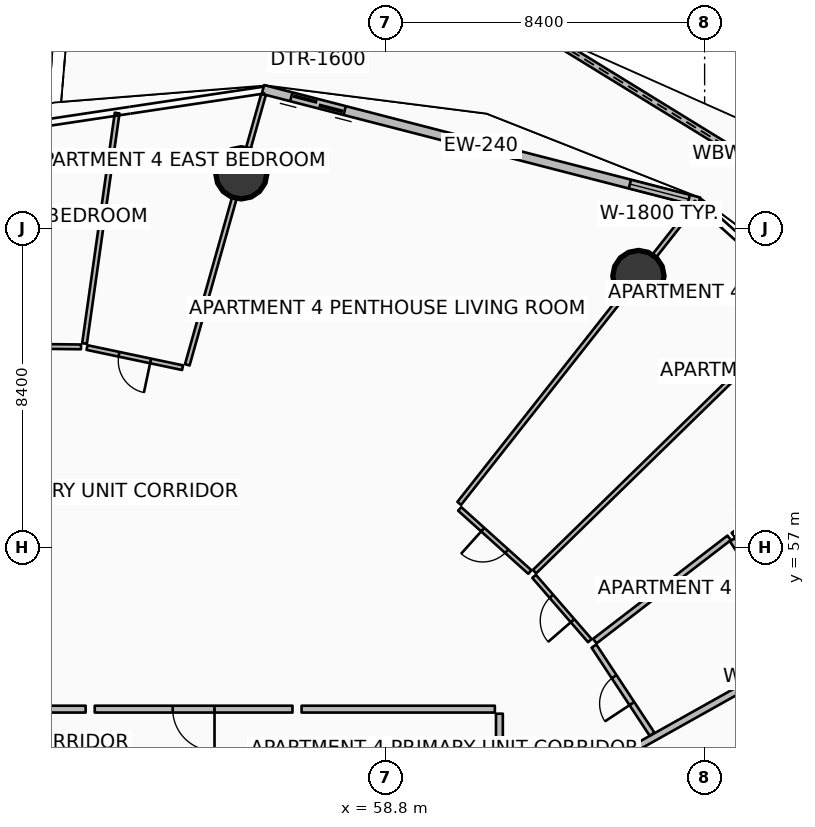
"""IFC4 building model, lengths in metres.
Left out: names, types, materials, properties, quantities, classifications, styles, units other than length and angle.
Written with IfcOpenShell. Run it as: python <this file> out.ifc"""

import sys

from ifc_helpers import new_model, si_unit, direction, frame, frame_2d, origin, origin_2d, place, context, subcontext, project, spatial, polyline, rectangle, circle, outline, extrude, element, fill, save


model = new_model("IFC4")
c1 = context("Model", 3, precision=1e-05, world=origin(), true_north=direction((0.0, 1.0)))
c2 = subcontext(c1, "Body", "Model", "MODEL_VIEW")
j1 = project(units=[si_unit("LENGTHUNIT", "METRE"), si_unit("PLANEANGLEUNIT", "RADIAN")], contexts=[c1])
p1 = place(None, origin())
s1 = spatial("IfcSite", under=j1, at=p1, CompositionType="ELEMENT")
p2 = place(p1, origin())
s2 = spatial("IfcBuilding", under=s1, at=p2, CompositionType="ELEMENT")
p3 = place(p2, frame((0.0, 0.0, 67.65)))
s3 = spatial("IfcBuildingStorey", under=s2, at=p3, CompositionType="ELEMENT", Elevation=67.65)
for number, where, z_axis, x_axis in (
    (1, (65.458, 64.146, 0.0), (0.0, 0.0, 1.0), (1.0, 0.0, 0.0)),
    (2, (55.008, 66.849, 0.0), (0.0, 0.0, 1.0), (1.0, 0.0, 0.0)),
):
    element("IfcColumn", number, at=place(p3, frame(where, z_axis=z_axis, x_axis=x_axis)), inside=s3, PredefinedType="COLUMN", context=c2, shape_type="SweptSolid", body=[
        extrude(circle(Radius=0.675, at=origin_2d()), origin(), (0.0, 0.0, 1.0), 3.35),
    ])
p4 = place(p3, frame((73.488, 64.039, 0.0), z_axis=(0.0, 0.0, 1.0), x_axis=(-0.851732671453, 0.523976579991, 0.0)))
e3 = element("IfcWall", 3, at=p4, inside=s3, PredefinedType="PARAPET", context=c2, shape_type="SweptSolid", body=[
    extrude(outline(polyline([(0.0, 0.0), (12.625, 0.0), (12.625, 1.832), (6.312, 1.696), (0.0, 1.497), (0.0, 0.0)])), frame((0.0, 0.09, 0.0), z_axis=(0.0, -1.0, 0.0), x_axis=(1.0, 0.0, 0.0)), (0.0, 0.0, 1.0), 0.18),
])
p5 = place(p3, frame((50.114, 71.14, 0.0), z_axis=(0.0, 0.0, 1.0), x_axis=(-0.956262130287, -0.292511090695, 0.0)))
e4 = element("IfcWall", 4, at=p5, inside=s3, PredefinedType="PARAPET", context=c2, shape_type="SweptSolid", body=[
    extrude(outline(polyline([(0.0, 0.0), (10.897, 0.0), (10.897, 1.348), (5.448, 1.562), (0.0, 1.747), (0.0, 0.0)])), frame((0.0, 0.09, 0.0), z_axis=(0.0, -1.0, 0.0), x_axis=(1.0, 0.0, 0.0)), (0.0, 0.0, 1.0), 0.18),
])
p6 = place(p3, frame((67.054, 66.096, 0.0), z_axis=(0.0, 0.0, 1.0), x_axis=(-0.96833871487, 0.249640007378, 0.0)))
e5 = element("IfcWall", 5, at=p6, inside=s3, PredefinedType="SOLIDWALL", context=c2, shape_type="SweptSolid", body=[
    extrude(rectangle(XDim=11.851, YDim=0.24, at=frame_2d((5.926, 0.0))), origin(), (0.0, 0.0, 1.0), 2.3),
])
p7 = place(p6, frame((9.631, 0.0, 0.0)))
e6 = element("IfcOpeningElement", 6, at=p7, cuts=e5, PredefinedType="OPENING", context=c2, shape_type="SweptSolid", body=[
    extrude(rectangle(XDim=1.45, YDim=2.15, at=frame_2d((0.725, 1.075))), frame((0.0, 0.13, 0.0), z_axis=(0.0, -1.0, 0.0), x_axis=(1.0, 0.0, 0.0)), (0.0, 0.0, 1.0), 0.26),
])
p8 = place(p6, frame((0.28, 0.0, 0.65)))
e7 = element("IfcOpeningElement", 7, at=p8, cuts=e5, PredefinedType="OPENING", context=c2, shape_type="SweptSolid", body=[
    extrude(rectangle(XDim=1.6, YDim=1.5, at=frame_2d((0.8, 0.75))), frame((0.0, 0.13, 0.0), z_axis=(0.0, -1.0, 0.0), x_axis=(1.0, 0.0, 0.0)), (0.0, 0.0, 1.0), 0.26),
])
p9 = place(p3, frame((61.896, 49.782, 0.0), z_axis=(0.0, 0.0, 1.0), x_axis=(0.872493215695, 0.488626225828, 0.0)))
e8 = element("IfcWall", 8, at=p9, inside=s3, PredefinedType="PARTITIONING", context=c2, shape_type="SweptSolid", body=[
    extrude(rectangle(XDim=15.612, YDim=0.18, at=frame_2d((7.806, 0.0))), origin(), (0.0, 0.0, 1.0), 2.717),
])
p10 = place(p3, frame((66.115, 49.008, 0.0), z_axis=(0.0, 0.0, 1.0), x_axis=(0.932641955578, 0.360803246514, 0.0)))
e9 = element("IfcWall", 9, at=p10, inside=s3, PredefinedType="PARTITIONING", context=c2, shape_type="SweptSolid", body=[
    extrude(rectangle(XDim=11.556, YDim=0.125, at=frame_2d((5.778, 0.0))), origin(), (0.0, 0.0, 1.0), 2.79),
])
p11 = place(p3, frame((56.354, 52.75, 0.0), z_axis=(0.0, 0.0, 1.0), x_axis=(-1.0, 0.0, 0.0)))
e10 = element("IfcWall", 10, at=p11, inside=s3, PredefinedType="PARTITIONING", context=c2, shape_type="SweptSolid", body=[
    extrude(rectangle(XDim=5.203, YDim=0.18, at=frame_2d((2.601, 0.0))), origin(), (0.0, 0.0, 1.0), 2.717),
])
p12 = place(p11, frame((2.052, 0.0, 0.0)))
e11 = element("IfcOpeningElement", 11, at=p12, cuts=e10, PredefinedType="OPENING", context=c2, shape_type="SweptSolid", body=[
    extrude(rectangle(XDim=1.1, YDim=2.1, at=frame_2d((0.55, 1.05))), frame((0.0, 0.1, 0.0), z_axis=(0.0, -1.0, 0.0), x_axis=(1.0, 0.0, 0.0)), (0.0, 0.0, 1.0), 0.2),
])
p13 = place(p3, frame((61.8, 49.848, 0.0), z_axis=(0.0, 0.0, 1.0), x_axis=(0.0, 1.0, 0.0)))
e12 = element("IfcWall", 12, at=p13, inside=s3, PredefinedType="PARTITIONING", context=c2, shape_type="SweptSolid", body=[
    extrude(rectangle(XDim=2.781, YDim=0.18, at=frame_2d((1.391, 0.0))), origin(), (0.0, 0.0, 1.0), 2.717),
])
p14 = place(p3, frame((61.68, 52.75, 0.0), z_axis=(0.0, 0.0, 1.0), x_axis=(-1.0, 0.0, 0.0)))
e13 = element("IfcWall", 13, at=p14, inside=s3, PredefinedType="PARTITIONING", context=c2, shape_type="SweptSolid", body=[
    extrude(rectangle(XDim=5.085, YDim=0.18, at=frame_2d((2.543, 0.0))), origin(), (0.0, 0.0, 1.0), 2.717),
])
p15 = place(p3, frame((60.743, 58.164, 0.0), z_axis=(0.0, 0.0, 1.0), x_axis=(0.61907620874, 0.785330916093, 0.0)))
e14 = element("IfcWall", 14, at=p15, inside=s3, PredefinedType="PARTITIONING", context=c2, shape_type="SweptSolid", body=[
    extrude(rectangle(XDim=10.091, YDim=0.125, at=frame_2d((5.046, 0.0))), origin(), (0.0, 0.0, 1.0), 2.717),
])
p16 = place(p3, frame((65.816, 52.092, 0.0), z_axis=(0.0, 0.0, 1.0), x_axis=(-0.550532146696, 0.834813964578, 0.0)))
e15 = element("IfcWall", 15, at=p16, inside=s3, PredefinedType="PARTITIONING", context=c2, shape_type="SweptSolid", body=[
    extrude(rectangle(XDim=2.776, YDim=0.15, at=frame_2d((1.388, 0.0))), origin(), (0.0, 0.0, 1.0), 2.717),
])
p17 = place(p16, frame((0.963, 0.0, 0.0)))
e16 = element("IfcOpeningElement", 16, at=p17, cuts=e15, PredefinedType="OPENING", context=c2, shape_type="SweptSolid", body=[
    extrude(rectangle(XDim=0.85, YDim=2.06, at=frame_2d((0.425, 1.03))), frame((0.0, 0.085, 0.0), z_axis=(0.0, -1.0, 0.0), x_axis=(1.0, 0.0, 0.0)), (0.0, 0.0, 1.0), 0.17),
])
p18 = place(p3, frame((69.821, 54.335, 0.0), z_axis=(0.0, 0.0, 1.0), x_axis=(-0.550516877558, 0.834824033868, 0.0)))
e17 = element("IfcWall", 17, at=p18, inside=s3, PredefinedType="PARTITIONING", context=c2, shape_type="SweptSolid", body=[
    extrude(rectangle(XDim=3.44, YDim=0.15, at=frame_2d((1.72, 0.0))), origin(), (0.0, 0.0, 1.0), 2.717),
])
p19 = place(p3, frame((64.31, 54.539, 0.0), z_axis=(0.0, 0.0, 1.0), x_axis=(0.792803030826, 0.609477935871, 0.0)))
e18 = element("IfcWall", 18, at=p19, inside=s3, PredefinedType="PARTITIONING", context=c2, shape_type="SweptSolid", body=[
    extrude(rectangle(XDim=4.46, YDim=0.15, at=frame_2d((2.23, 0.0))), origin(), (0.0, 0.0, 1.0), 2.79),
])
p20 = place(p3, frame((67.949, 57.337, 0.0), z_axis=(0.0, 0.0, 1.0), x_axis=(0.792800135679, 0.609481701832, 0.0)))
e19 = element("IfcWall", 19, at=p20, inside=s3, PredefinedType="PARTITIONING", context=c2, shape_type="SweptSolid", body=[
    extrude(rectangle(XDim=5.976, YDim=0.125, at=frame_2d((2.988, 0.0))), origin(), (0.0, 0.0, 1.0), 2.79),
])
p21 = place(p20, frame((2.563, 0.0, 0.0)))
e20 = element("IfcOpeningElement", 20, at=p21, cuts=e19, PredefinedType="OPENING", context=c2, shape_type="SweptSolid", body=[
    extrude(rectangle(XDim=0.85, YDim=2.06, at=frame_2d((0.425, 1.03))), frame((0.0, 0.073, 0.0), z_axis=(0.0, -1.0, 0.0), x_axis=(1.0, 0.0, 0.0)), (0.0, 0.0, 1.0), 0.145),
])
p22 = place(p3, frame((62.725, 56.368, 0.0), z_axis=(0.0, 0.0, 1.0), x_axis=(0.715749552764, 0.698357056038, 0.0)))
e21 = element("IfcWall", 21, at=p22, inside=s3, PredefinedType="PARTITIONING", context=c2, shape_type="SweptSolid", body=[
    extrude(rectangle(XDim=10.107, YDim=0.125, at=frame_2d((5.053, 0.0))), origin(), (0.0, 0.0, 1.0), 2.79),
])
p23 = place(p3, frame((64.18, 54.552, 0.0), z_axis=(0.0, 0.0, 1.0), x_axis=(-0.654947139149, 0.75567469517, 0.0)))
e22 = element("IfcWall", 22, at=p23, inside=s3, PredefinedType="PARTITIONING", context=c2, shape_type="SweptSolid", body=[
    extrude(rectangle(XDim=2.24, YDim=0.125, at=frame_2d((1.12, 0.0))), origin(), (0.0, 0.0, 1.0), 2.79),
])
p24 = place(p23, frame((0.695, 0.0, 0.0)))
e23 = element("IfcOpeningElement", 23, at=p24, cuts=e22, PredefinedType="OPENING", context=c2, shape_type="SweptSolid", body=[
    extrude(rectangle(XDim=0.85, YDim=2.06, at=frame_2d((0.425, 1.03))), frame((0.0, 0.073, 0.0), z_axis=(0.0, -1.0, 0.0), x_axis=(1.0, 0.0, 0.0)), (0.0, 0.0, 1.0), 0.145),
])
p25 = place(p3, frame((62.601, 56.358, 0.0), z_axis=(0.0, 0.0, 1.0), x_axis=(-0.743435913228, 0.66880717918, 0.0)))
e24 = element("IfcWall", 24, at=p25, inside=s3, PredefinedType="PARTITIONING", context=c2, shape_type="SweptSolid", body=[
    extrude(rectangle(XDim=2.483, YDim=0.125, at=frame_2d((1.241, 0.0))), origin(), (0.0, 0.0, 1.0), 2.717),
])
p26 = place(p25, frame((0.816, 0.0, 0.0)))
e25 = element("IfcOpeningElement", 25, at=p26, cuts=e24, PredefinedType="OPENING", context=c2, shape_type="SweptSolid", body=[
    extrude(rectangle(XDim=0.85, YDim=2.06, at=frame_2d((0.425, 1.03))), frame((0.0, 0.073, 0.0), z_axis=(0.0, -1.0, 0.0), x_axis=(1.0, 0.0, 0.0)), (0.0, 0.0, 1.0), 0.145),
])
p27 = place(p3, frame((50.912, 52.75, 0.0), z_axis=(0.0, 0.0, 1.0), x_axis=(-1.0, 0.0, 0.0)))
e26 = element("IfcWall", 26, at=p27, inside=s3, PredefinedType="PARTITIONING", context=c2, shape_type="SweptSolid", body=[
    extrude(rectangle(XDim=4.064, YDim=0.18, at=frame_2d((2.032, 0.0))), origin(), (0.0, 0.0, 1.0), 2.717),
])
p28 = place(p3, frame((53.587, 61.81, 0.0), z_axis=(0.0, 0.0, 1.0), x_axis=(0.271464088879, 0.962448569249, 0.0)))
e27 = element("IfcWall", 27, at=p28, inside=s3, PredefinedType="PARTITIONING", context=c2, shape_type="SweptSolid", body=[
    extrude(rectangle(XDim=7.389, YDim=0.125, at=frame_2d((3.695, 0.0))), origin(), (0.0, 0.0, 1.0), 2.717),
])
p29 = place(p3, frame((50.883, 62.37, 0.0), z_axis=(0.0, 0.0, 1.0), x_axis=(0.140126411414, 0.990133621702, 0.0)))
e28 = element("IfcWall", 28, at=p29, inside=s3, PredefinedType="PARTITIONING", context=c2, shape_type="SweptSolid", body=[
    extrude(rectangle(XDim=6.124, YDim=0.125, at=frame_2d((3.062, 0.0))), origin(), (0.0, 0.0, 1.0), 2.79),
])
p30 = place(p3, frame((53.462, 61.735, 0.0), z_axis=(0.0, 0.0, 1.0), x_axis=(-0.978499333356, 0.206249980902, 0.0)))
e29 = element("IfcWall", 29, at=p30, inside=s3, PredefinedType="PARTITIONING", context=c2, shape_type="SweptSolid", body=[
    extrude(rectangle(XDim=2.569, YDim=0.125, at=frame_2d((1.284, 0.0))), origin(), (0.0, 0.0, 1.0), 2.717),
])
p31 = place(p30, frame((0.859, 0.0, 0.0)))
e30 = element("IfcOpeningElement", 30, at=p31, cuts=e29, PredefinedType="OPENING", context=c2, shape_type="SweptSolid", body=[
    extrude(rectangle(XDim=0.85, YDim=2.06, at=frame_2d((0.425, 1.03))), frame((0.0, 0.073, 0.0), z_axis=(0.0, -1.0, 0.0), x_axis=(1.0, 0.0, 0.0)), (0.0, 0.0, 1.0), 0.145),
])
p32 = place(p3, frame((50.79, 62.282, 0.0), z_axis=(0.0, 0.0, 1.0), x_axis=(-0.99993505002, 0.011397181261, 0.0)))
e31 = element("IfcWall", 31, at=p32, inside=s3, PredefinedType="PARTITIONING", context=c2, shape_type="SweptSolid", body=[
    extrude(rectangle(XDim=5.098, YDim=0.125, at=frame_2d((2.549, 0.0))), origin(), (0.0, 0.0, 1.0), 2.717),
])
p33 = place(p32, frame((2.099, 0.0, 0.0)))
e32 = element("IfcOpeningElement", 32, at=p33, cuts=e31, PredefinedType="OPENING", context=c2, shape_type="SweptSolid", body=[
    extrude(rectangle(XDim=0.9, YDim=2.08, at=frame_2d((0.45, 1.04))), frame((0.0, 0.073, 0.0), z_axis=(0.0, -1.0, 0.0), x_axis=(1.0, 0.0, 0.0)), (0.0, 0.0, 1.0), 0.145),
])
p34 = place(p7, origin())
e33 = element("IfcDoor", 33, at=p34, inside=s3, OperationType="DOUBLE_DOOR_SLIDING", PredefinedType="DOOR", context=c2, shape_type="SweptSolid", body=[
    extrude(rectangle(XDim=1.45, YDim=2.15, at=frame_2d((0.725, 1.075))), frame((0.0, 0.025, 0.0), z_axis=(0.0, -1.0, 0.0), x_axis=(1.0, 0.0, 0.0)), (0.0, 0.0, 1.0), 0.05),
])
fill(e6, e33)
p35 = place(p8, origin())
e34 = element("IfcWindow", 34, at=p35, inside=s3, PartitioningType="SINGLE_PANEL", PredefinedType="WINDOW", context=c2, shape_type="SweptSolid", body=[
    extrude(rectangle(XDim=1.6, YDim=1.5, at=frame_2d((0.8, 0.75))), frame((0.0, 0.03, 0.0), z_axis=(0.0, -1.0, 0.0), x_axis=(1.0, 0.0, 0.0)), (0.0, 0.0, 1.0), 0.06),
])
fill(e7, e34)
p36 = place(p12, origin())
e35 = element("IfcDoor", 35, at=p36, inside=s3, OperationType="SINGLE_SWING_LEFT", PredefinedType="DOOR", context=c2, shape_type="SweptSolid", body=[
    extrude(rectangle(XDim=1.1, YDim=2.1, at=frame_2d((0.55, 1.05))), frame((0.0, 0.025, 0.0), z_axis=(0.0, -1.0, 0.0), x_axis=(1.0, 0.0, 0.0)), (0.0, 0.0, 1.0), 0.05),
])
fill(e11, e35)
p37 = place(p17, origin())
e36 = element("IfcDoor", 36, at=p37, inside=s3, OperationType="SINGLE_SWING_LEFT", PredefinedType="DOOR", context=c2, shape_type="SweptSolid", body=[
    extrude(rectangle(XDim=0.85, YDim=2.06, at=frame_2d((0.425, 1.03))), frame((0.0, 0.025, 0.0), z_axis=(0.0, -1.0, 0.0), x_axis=(1.0, 0.0, 0.0)), (0.0, 0.0, 1.0), 0.05),
])
fill(e16, e36)
p38 = place(p24, origin())
e37 = element("IfcDoor", 37, at=p38, inside=s3, OperationType="SINGLE_SWING_LEFT", PredefinedType="DOOR", context=c2, shape_type="SweptSolid", body=[
    extrude(rectangle(XDim=0.85, YDim=2.06, at=frame_2d((0.425, 1.03))), frame((0.0, 0.025, 0.0), z_axis=(0.0, -1.0, 0.0), x_axis=(1.0, 0.0, 0.0)), (0.0, 0.0, 1.0), 0.05),
])
fill(e23, e37)
p39 = place(p26, origin())
e38 = element("IfcDoor", 38, at=p39, inside=s3, OperationType="SINGLE_SWING_RIGHT", PredefinedType="DOOR", context=c2, shape_type="SweptSolid", body=[
    extrude(rectangle(XDim=0.85, YDim=2.06, at=frame_2d((0.425, 1.03))), frame((0.0, 0.025, 0.0), z_axis=(0.0, -1.0, 0.0), x_axis=(1.0, 0.0, 0.0)), (0.0, 0.0, 1.0), 0.05),
])
fill(e25, e38)
p40 = place(p31, origin())
e39 = element("IfcDoor", 39, at=p40, inside=s3, OperationType="SINGLE_SWING_LEFT", PredefinedType="DOOR", context=c2, shape_type="SweptSolid", body=[
    extrude(rectangle(XDim=0.85, YDim=2.06, at=frame_2d((0.425, 1.03))), frame((0.0, 0.025, 0.0), z_axis=(0.0, -1.0, 0.0), x_axis=(1.0, 0.0, 0.0)), (0.0, 0.0, 1.0), 0.05),
])
fill(e30, e39)
save(model, sys.argv[1])
